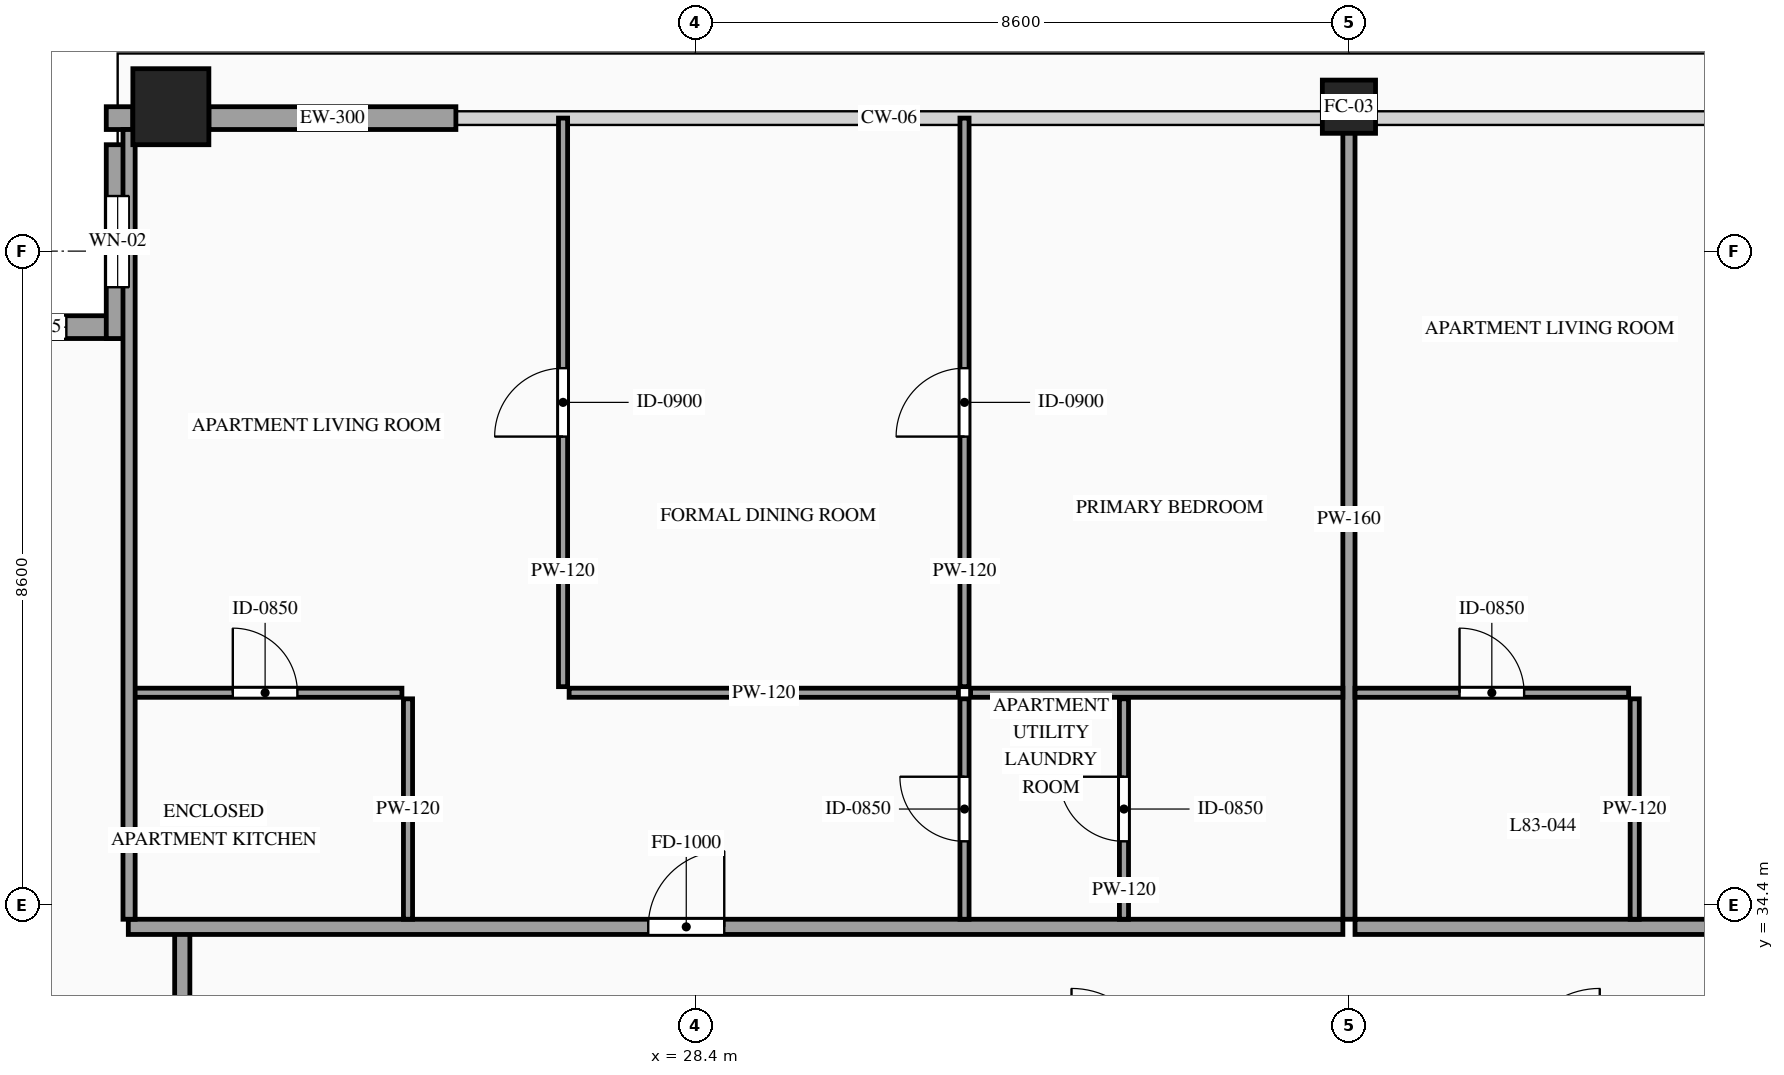
"""IFC4 building model, lengths in metres.
Left out: names, types, materials, properties, quantities, classifications, styles, units other than length and angle.
Written with IfcOpenShell. Run it as: python <this file> out.ifc"""

import sys

from ifc_helpers import new_model, si_unit, direction, frame, frame_2d, origin, origin_2d, place, context, subcontext, project, spatial, rectangle, hollow_rectangle, extrude, source, transform, mapped, element, fill, save


model = new_model("IFC4")
c1 = context("Model", 3, precision=1e-05, world=origin(), true_north=direction((0.0, 1.0)))
c2 = subcontext(c1, "Body", "Model", "MODEL_VIEW")
j1 = project(units=[si_unit("LENGTHUNIT", "METRE"), si_unit("PLANEANGLEUNIT", "RADIAN")], contexts=[c1])
p1 = place(None, origin())
s1 = spatial("IfcSite", under=j1, at=p1, CompositionType="ELEMENT")
p2 = place(p1, origin())
s2 = spatial("IfcBuilding", under=s1, at=p2, CompositionType="ELEMENT")
p3 = place(p2, frame((0.0, 0.0, 311.2)))
s3 = spatial("IfcBuildingStorey", under=s2, at=p3, CompositionType="ELEMENT", Elevation=311.2)
m1 = source(origin(), c2, "Body", "SweptSolid", [
    extrude(hollow_rectangle(XDim=1.0, YDim=1.0, WallThickness=0.048, at=origin_2d()), origin(), (0.0, 0.0, 1.0), 3.5),
])
p4 = place(p3, frame((21.5, 44.9, 0.0), z_axis=(0.0, 0.0, 1.0), x_axis=(1.0, 0.0, 0.0)))
e1 = element("IfcColumn", 1, at=p4, inside=s3, PredefinedType="COLUMN", context=c2, shape_type="MappedRepresentation", body=[
    mapped(m1, transform((0.0, 0.0, 0.0), scale=1.0)),
])
m2 = source(origin(), c2, "Body", "SweptSolid", [
    extrude(hollow_rectangle(XDim=0.7, YDim=0.7, WallThickness=0.032, at=origin_2d()), origin(), (0.0, 0.0, 1.0), 3.5),
])
p5 = place(p3, frame((37.0, 44.9, 0.0), z_axis=(0.0, 0.0, 1.0), x_axis=(1.0, 0.0, 0.0)))
e2 = element("IfcColumn", 2, at=p5, inside=s3, PredefinedType="COLUMN", context=c2, shape_type="MappedRepresentation", body=[
    mapped(m2, transform((0.0, 0.0, 0.0), scale=1.0)),
])
p6 = place(p3, frame((20.95, 42.0, 0.0), z_axis=(0.0, 0.0, 1.0), x_axis=(-1.0, 0.0, 0.0)))
e3 = element("IfcWall", 3, at=p6, inside=s3, PredefinedType="SOLIDWALL", context=c2, shape_type="SweptSolid", body=[
    extrude(rectangle(XDim=2.55, YDim=0.3, at=frame_2d((1.275, 0.0))), origin(), (0.0, 0.0, 1.0), 3.28),
])
p7 = place(p6, frame((0.825, 0.0, 0.85)))
e4 = element("IfcOpeningElement", 4, at=p7, cuts=e3, PredefinedType="OPENING", context=c2, shape_type="SweptSolid", body=[
    extrude(rectangle(XDim=0.9, YDim=1.5, at=frame_2d((0.45, 0.75))), frame((0.0, 0.165, 0.0), z_axis=(0.0, -1.0, 0.0), x_axis=(1.0, 0.0, 0.0)), (0.0, 0.0, 1.0), 0.33),
])
p8 = place(p3, frame((20.8, 44.4, 0.0), z_axis=(0.0, 0.0, 1.0), x_axis=(0.0, -1.0, 0.0)))
e5 = element("IfcWall", 5, at=p8, inside=s3, PredefinedType="SOLIDWALL", context=c2, shape_type="SweptSolid", body=[
    extrude(rectangle(XDim=2.55, YDim=0.3, at=frame_2d((1.275, 0.0))), origin(), (0.0, 0.0, 1.0), 3.28),
])
p9 = place(p8, frame((0.675, 0.0, 0.85)))
e6 = element("IfcOpeningElement", 6, at=p9, cuts=e5, PredefinedType="OPENING", context=c2, shape_type="SweptSolid", body=[
    extrude(rectangle(XDim=1.2, YDim=2.1, at=frame_2d((0.6, 1.05))), frame((0.0, 0.165, 0.0), z_axis=(0.0, -1.0, 0.0), x_axis=(1.0, 0.0, 0.0)), (0.0, 0.0, 1.0), 0.33),
])
m3 = source(origin(), c2, "Body", "SweptSolid", [
    extrude(rectangle(XDim=0.35, YDim=0.3, at=frame_2d((0.175, 0.0))), origin(), (0.0, 0.0, 1.0), 3.28),
])
p10 = place(p3, frame((20.65, 44.75, 0.0), z_axis=(0.0, 0.0, 1.0), x_axis=(1.0, 0.0, 0.0)))
e7 = element("IfcWall", 7, at=p10, inside=s3, PredefinedType="SOLIDWALL", context=c2, shape_type="MappedRepresentation", body=[
    mapped(m3, transform((0.0, 0.0, 0.0), scale=1.0)),
])
m4 = source(origin(), c2, "Body", "SweptSolid", [
    extrude(rectangle(XDim=3.25, YDim=0.3, at=frame_2d((1.625, 0.0))), origin(), (0.0, 0.0, 1.0), 2.885),
])
p11 = place(p3, frame((22.0, 44.75, 0.0), z_axis=(0.0, 0.0, 1.0), x_axis=(1.0, 0.0, 0.0)))
e8 = element("IfcWall", 8, at=p11, inside=s3, PredefinedType="SOLIDWALL", context=c2, shape_type="MappedRepresentation", body=[
    mapped(m4, transform((0.0, 0.0, 0.0), scale=1.0)),
])
m5 = source(origin(), c2, "Body", "SweptSolid", [
    extrude(rectangle(XDim=1.7, YDim=0.2, at=frame_2d((0.85, 0.0))), origin(), (0.0, 0.0, 1.0), 3.28),
])
p12 = place(p3, frame((21.65, 32.35, 0.0), z_axis=(0.0, 0.0, 1.0), x_axis=(0.0, 1.0, 0.0)))
e9 = element("IfcWall", 9, at=p12, inside=s3, PredefinedType="PARTITIONING", context=c2, shape_type="MappedRepresentation", body=[
    mapped(m5, transform((0.0, 0.0, 0.0), scale=1.0)),
])
p13 = place(p3, frame((20.94, 34.11, 0.0), z_axis=(0.0, 0.0, 1.0), x_axis=(1.0, 0.0, 0.0)))
e10 = element("IfcWall", 10, at=p13, inside=s3, PredefinedType="PARTITIONING", context=c2, shape_type="SweptSolid", body=[
    extrude(rectangle(XDim=15.98, YDim=0.2, at=frame_2d((7.99, 0.0))), origin(), (0.0, 0.0, 1.0), 3.28),
])
p14 = place(p13, frame((6.841, 0.0, 0.0)))
e11 = element("IfcOpeningElement", 11, at=p14, cuts=e10, PredefinedType="OPENING", context=c2, shape_type="SweptSolid", body=[
    extrude(rectangle(XDim=1.0, YDim=2.2, at=frame_2d((0.5, 1.1))), frame((0.0, 0.115, 0.0), z_axis=(0.0, -1.0, 0.0), x_axis=(1.0, 0.0, 0.0)), (0.0, 0.0, 1.0), 0.23),
])
m6 = source(origin(), c2, "Body", "SweptSolid", [
    extrude(rectangle(XDim=10.54, YDim=0.16, at=frame_2d((5.27, 0.0))), origin(), (0.0, 0.0, 1.0), 2.787),
])
p15 = place(p3, frame((37.0, 34.21, 0.0), z_axis=(0.0, 0.0, 1.0), x_axis=(0.0, 1.0, 0.0)))
e12 = element("IfcWall", 12, at=p15, inside=s3, PredefinedType="PARTITIONING", context=c2, shape_type="MappedRepresentation", body=[
    mapped(m6, transform((0.0, 0.0, 0.0), scale=1.0)),
])
p16 = place(p3, frame((20.94, 37.19, 0.0), z_axis=(0.0, 0.0, 1.0), x_axis=(1.0, 0.0, 0.0)))
e13 = element("IfcWall", 13, at=p16, inside=s3, PredefinedType="PARTITIONING", context=c2, shape_type="SweptSolid", body=[
    extrude(rectangle(XDim=3.6, YDim=0.12, at=frame_2d((1.8, 0.0))), origin(), (0.0, 0.0, 1.0), 3.28),
])
p17 = place(p16, frame((1.375, 0.0, 0.0)))
e14 = element("IfcOpeningElement", 14, at=p17, cuts=e13, PredefinedType="OPENING", context=c2, shape_type="SweptSolid", body=[
    extrude(rectangle(XDim=0.85, YDim=2.1, at=frame_2d((0.425, 1.05))), frame((0.0, 0.075, 0.0), z_axis=(0.0, -1.0, 0.0), x_axis=(1.0, 0.0, 0.0)), (0.0, 0.0, 1.0), 0.15),
])
m7 = source(origin(), c2, "Body", "SweptSolid", [
    extrude(rectangle(XDim=2.9, YDim=0.12, at=frame_2d((1.45, 0.0))), origin(), (0.0, 0.0, 1.0), 3.28),
])
p18 = place(p3, frame((24.62, 34.21, 0.0), z_axis=(0.0, 0.0, 1.0), x_axis=(0.0, 1.0, 0.0)))
e15 = element("IfcWall", 15, at=p18, inside=s3, PredefinedType="PARTITIONING", context=c2, shape_type="MappedRepresentation", body=[
    mapped(m7, transform((0.0, 0.0, 0.0), scale=1.0)),
])
p19 = place(p3, frame((34.04, 34.21, 0.0), z_axis=(0.0, 0.0, 1.0), x_axis=(0.0, 1.0, 0.0)))
e16 = element("IfcWall", 16, at=p19, inside=s3, PredefinedType="PARTITIONING", context=c2, shape_type="SweptSolid", body=[
    extrude(rectangle(XDim=2.9, YDim=0.12, at=frame_2d((1.45, 0.0))), origin(), (0.0, 0.0, 1.0), 3.28),
])
p20 = place(p19, frame((1.025, 0.0, 0.0)))
e17 = element("IfcOpeningElement", 17, at=p20, cuts=e16, PredefinedType="OPENING", context=c2, shape_type="SweptSolid", body=[
    extrude(rectangle(XDim=0.85, YDim=2.1, at=frame_2d((0.425, 1.05))), frame((0.0, 0.075, 0.0), z_axis=(0.0, -1.0, 0.0), x_axis=(1.0, 0.0, 0.0)), (0.0, 0.0, 1.0), 0.15),
])
m8 = source(origin(), c2, "Body", "SweptSolid", [
    extrude(rectangle(XDim=4.898, YDim=0.12, at=frame_2d((2.449, 0.0))), origin(), (0.0, 0.0, 1.0), 3.28),
])
p21 = place(p3, frame((32.022, 37.19, 0.0), z_axis=(0.0, 0.0, 1.0), x_axis=(1.0, 0.0, 0.0)))
e18 = element("IfcWall", 18, at=p21, inside=s3, PredefinedType="PARTITIONING", context=c2, shape_type="MappedRepresentation", body=[
    mapped(m8, transform((0.0, 0.0, 0.0), scale=1.0)),
])
p22 = place(p3, frame((31.942, 37.27, 0.0), z_axis=(0.0, 0.0, 1.0), x_axis=(0.0, 1.0, 0.0)))
e19 = element("IfcWall", 19, at=p22, inside=s3, PredefinedType="PARTITIONING", context=c2, shape_type="SweptSolid", body=[
    extrude(rectangle(XDim=7.48, YDim=0.12, at=frame_2d((3.74, 0.0))), origin(), (0.0, 0.0, 1.0), 3.28),
])
p23 = place(p22, frame((3.29, 0.0, 0.0)))
e20 = element("IfcOpeningElement", 20, at=p23, cuts=e19, PredefinedType="OPENING", context=c2, shape_type="SweptSolid", body=[
    extrude(rectangle(XDim=0.9, YDim=2.15, at=frame_2d((0.45, 1.075))), frame((0.0, 0.075, 0.0), z_axis=(0.0, -1.0, 0.0), x_axis=(1.0, 0.0, 0.0)), (0.0, 0.0, 1.0), 0.15),
])
p24 = place(p3, frame((31.942, 34.21, 0.0), z_axis=(0.0, 0.0, 1.0), x_axis=(0.0, 1.0, 0.0)))
e21 = element("IfcWall", 21, at=p24, inside=s3, PredefinedType="PARTITIONING", context=c2, shape_type="SweptSolid", body=[
    extrude(rectangle(XDim=2.9, YDim=0.12, at=frame_2d((1.45, 0.0))), origin(), (0.0, 0.0, 1.0), 3.28),
])
p25 = place(p24, frame((1.025, 0.0, 0.0)))
e22 = element("IfcOpeningElement", 22, at=p25, cuts=e21, PredefinedType="OPENING", context=c2, shape_type="SweptSolid", body=[
    extrude(rectangle(XDim=0.85, YDim=2.1, at=frame_2d((0.425, 1.05))), frame((0.0, 0.075, 0.0), z_axis=(0.0, -1.0, 0.0), x_axis=(1.0, 0.0, 0.0)), (0.0, 0.0, 1.0), 0.15),
])
m9 = source(origin(), c2, "Body", "SweptSolid", [
    extrude(rectangle(XDim=5.122, YDim=0.12, at=frame_2d((2.561, 0.0))), origin(), (0.0, 0.0, 1.0), 3.28),
])
p26 = place(p3, frame((26.74, 37.19, 0.0), z_axis=(0.0, 0.0, 1.0), x_axis=(1.0, 0.0, 0.0)))
e23 = element("IfcWall", 23, at=p26, inside=s3, PredefinedType="PARTITIONING", context=c2, shape_type="MappedRepresentation", body=[
    mapped(m9, transform((0.0, 0.0, 0.0), scale=1.0)),
])
p27 = place(p3, frame((26.66, 37.27, 0.0), z_axis=(0.0, 0.0, 1.0), x_axis=(0.0, 1.0, 0.0)))
e24 = element("IfcWall", 24, at=p27, inside=s3, PredefinedType="PARTITIONING", context=c2, shape_type="SweptSolid", body=[
    extrude(rectangle(XDim=7.48, YDim=0.12, at=frame_2d((3.74, 0.0))), origin(), (0.0, 0.0, 1.0), 3.28),
])
p28 = place(p27, frame((3.29, 0.0, 0.0)))
e25 = element("IfcOpeningElement", 25, at=p28, cuts=e24, PredefinedType="OPENING", context=c2, shape_type="SweptSolid", body=[
    extrude(rectangle(XDim=0.9, YDim=2.15, at=frame_2d((0.45, 1.075))), frame((0.0, 0.075, 0.0), z_axis=(0.0, -1.0, 0.0), x_axis=(1.0, 0.0, 0.0)), (0.0, 0.0, 1.0), 0.15),
])
p29 = place(p3, frame((37.08, 34.11, 0.0), z_axis=(0.0, 0.0, 1.0), x_axis=(1.0, 0.0, 0.0)))
e26 = element("IfcWall", 26, at=p29, inside=s3, PredefinedType="PARTITIONING", context=c2, shape_type="SweptSolid", body=[
    extrude(rectangle(XDim=15.98, YDim=0.2, at=frame_2d((7.99, 0.0))), origin(), (0.0, 0.0, 1.0), 3.28),
])
p30 = place(p29, frame((5.965, 0.0, 0.0)))
e27 = element("IfcOpeningElement", 27, at=p30, cuts=e26, PredefinedType="OPENING", context=c2, shape_type="SweptSolid", body=[
    extrude(rectangle(XDim=1.0, YDim=2.2, at=frame_2d((0.5, 1.1))), frame((0.0, 0.115, 0.0), z_axis=(0.0, -1.0, 0.0), x_axis=(1.0, 0.0, 0.0)), (0.0, 0.0, 1.0), 0.23),
])
m10 = source(origin(), c2, "Body", "SweptSolid", [
    extrude(rectangle(XDim=10.39, YDim=0.16, at=frame_2d((5.195, 0.0))), origin(), (0.0, 0.0, 1.0), 3.28),
])
p31 = place(p3, frame((20.95, 34.21, 0.0), z_axis=(0.0, 0.0, 1.0), x_axis=(0.0, 1.0, 0.0)))
e28 = element("IfcWall", 28, at=p31, inside=s3, PredefinedType="PARTITIONING", context=c2, shape_type="MappedRepresentation", body=[
    mapped(m10, transform((0.0, 0.0, 0.0), scale=1.0)),
])
p32 = place(p3, frame((37.08, 37.19, 0.0), z_axis=(0.0, 0.0, 1.0), x_axis=(1.0, 0.0, 0.0)))
e29 = element("IfcWall", 29, at=p32, inside=s3, PredefinedType="PARTITIONING", context=c2, shape_type="SweptSolid", body=[
    extrude(rectangle(XDim=3.6, YDim=0.12, at=frame_2d((1.8, 0.0))), origin(), (0.0, 0.0, 1.0), 3.28),
])
p33 = place(p32, frame((1.375, 0.0, 0.0)))
e30 = element("IfcOpeningElement", 30, at=p33, cuts=e29, PredefinedType="OPENING", context=c2, shape_type="SweptSolid", body=[
    extrude(rectangle(XDim=0.85, YDim=2.1, at=frame_2d((0.425, 1.05))), frame((0.0, 0.075, 0.0), z_axis=(0.0, -1.0, 0.0), x_axis=(1.0, 0.0, 0.0)), (0.0, 0.0, 1.0), 0.15),
])
p34 = place(p3, frame((40.76, 34.21, 0.0), z_axis=(0.0, 0.0, 1.0), x_axis=(0.0, 1.0, 0.0)))
e31 = element("IfcWall", 31, at=p34, inside=s3, PredefinedType="PARTITIONING", context=c2, shape_type="MappedRepresentation", body=[
    mapped(m7, transform((0.0, 0.0, 0.0), scale=1.0)),
])
m11 = source(origin(), c2, "Body", "SweptSolid", [
    extrude(rectangle(XDim=0.9, YDim=1.5, at=frame_2d((0.45, 0.75))), frame((0.0, 0.03, 0.0), z_axis=(0.0, -1.0, 0.0), x_axis=(1.0, 0.0, 0.0)), (0.0, 0.0, 1.0), 0.06),
])
p35 = place(p7, origin())
e32 = element("IfcWindow", 32, at=p35, inside=s3, PartitioningType="SINGLE_PANEL", PredefinedType="WINDOW", context=c2, shape_type="MappedRepresentation", body=[
    mapped(m11, transform((0.0, 0.0, 0.0), scale=1.0)),
])
fill(e4, e32)
m12 = source(origin(), c2, "Body", "SweptSolid", [
    extrude(rectangle(XDim=1.2, YDim=2.1, at=frame_2d((0.6, 1.05))), frame((0.0, 0.03, 0.0), z_axis=(0.0, -1.0, 0.0), x_axis=(1.0, 0.0, 0.0)), (0.0, 0.0, 1.0), 0.06),
])
p36 = place(p9, origin())
e33 = element("IfcWindow", 33, at=p36, inside=s3, PartitioningType="SINGLE_PANEL", PredefinedType="WINDOW", context=c2, shape_type="MappedRepresentation", body=[
    mapped(m12, transform((0.0, 0.0, 0.0), scale=1.0)),
])
fill(e6, e33)
m13 = source(origin(), c2, "Body", "SweptSolid", [
    extrude(rectangle(XDim=1.0, YDim=2.2, at=frame_2d((0.5, 1.1))), frame((0.0, 0.025, 0.0), z_axis=(0.0, -1.0, 0.0), x_axis=(1.0, 0.0, 0.0)), (0.0, 0.0, 1.0), 0.05),
])
p37 = place(p14, origin())
e34 = element("IfcDoor", 34, at=p37, inside=s3, OperationType="SINGLE_SWING_RIGHT", PredefinedType="DOOR", context=c2, shape_type="MappedRepresentation", body=[
    mapped(m13, transform((0.0, 0.0, 0.0), scale=1.0)),
])
fill(e11, e34)
m14 = source(origin(), c2, "Body", "SweptSolid", [
    extrude(rectangle(XDim=0.85, YDim=2.1, at=frame_2d((0.425, 1.05))), frame((0.0, 0.025, 0.0), z_axis=(0.0, -1.0, 0.0), x_axis=(1.0, 0.0, 0.0)), (0.0, 0.0, 1.0), 0.05),
])
p38 = place(p17, origin())
e35 = element("IfcDoor", 35, at=p38, inside=s3, OperationType="SINGLE_SWING_LEFT", PredefinedType="DOOR", context=c2, shape_type="MappedRepresentation", body=[
    mapped(m14, transform((0.0, 0.0, 0.0), scale=1.0)),
])
fill(e14, e35)
p39 = place(p20, origin())
e36 = element("IfcDoor", 36, at=p39, inside=s3, OperationType="SINGLE_SWING_RIGHT", PredefinedType="DOOR", context=c2, shape_type="MappedRepresentation", body=[
    mapped(m14, transform((0.0, 0.0, 0.0), scale=1.0)),
])
fill(e17, e36)
m15 = source(origin(), c2, "Body", "SweptSolid", [
    extrude(rectangle(XDim=0.9, YDim=2.15, at=frame_2d((0.45, 1.075))), frame((0.0, 0.025, 0.0), z_axis=(0.0, -1.0, 0.0), x_axis=(1.0, 0.0, 0.0)), (0.0, 0.0, 1.0), 0.05),
])
p40 = place(p23, origin())
e37 = element("IfcDoor", 37, at=p40, inside=s3, OperationType="SINGLE_SWING_LEFT", PredefinedType="DOOR", context=c2, shape_type="MappedRepresentation", body=[
    mapped(m15, transform((0.0, 0.0, 0.0), scale=1.0)),
])
fill(e20, e37)
p41 = place(p25, origin())
e38 = element("IfcDoor", 38, at=p41, inside=s3, OperationType="SINGLE_SWING_RIGHT", PredefinedType="DOOR", context=c2, shape_type="MappedRepresentation", body=[
    mapped(m14, transform((0.0, 0.0, 0.0), scale=1.0)),
])
fill(e22, e38)
p42 = place(p28, origin())
e39 = element("IfcDoor", 39, at=p42, inside=s3, OperationType="SINGLE_SWING_LEFT", PredefinedType="DOOR", context=c2, shape_type="MappedRepresentation", body=[
    mapped(m15, transform((0.0, 0.0, 0.0), scale=1.0)),
])
fill(e25, e39)
p43 = place(p33, origin())
e40 = element("IfcDoor", 40, at=p43, inside=s3, OperationType="SINGLE_SWING_LEFT", PredefinedType="DOOR", context=c2, shape_type="MappedRepresentation", body=[
    mapped(m14, transform((0.0, 0.0, 0.0), scale=1.0)),
])
fill(e30, e40)
save(model, sys.argv[1])
